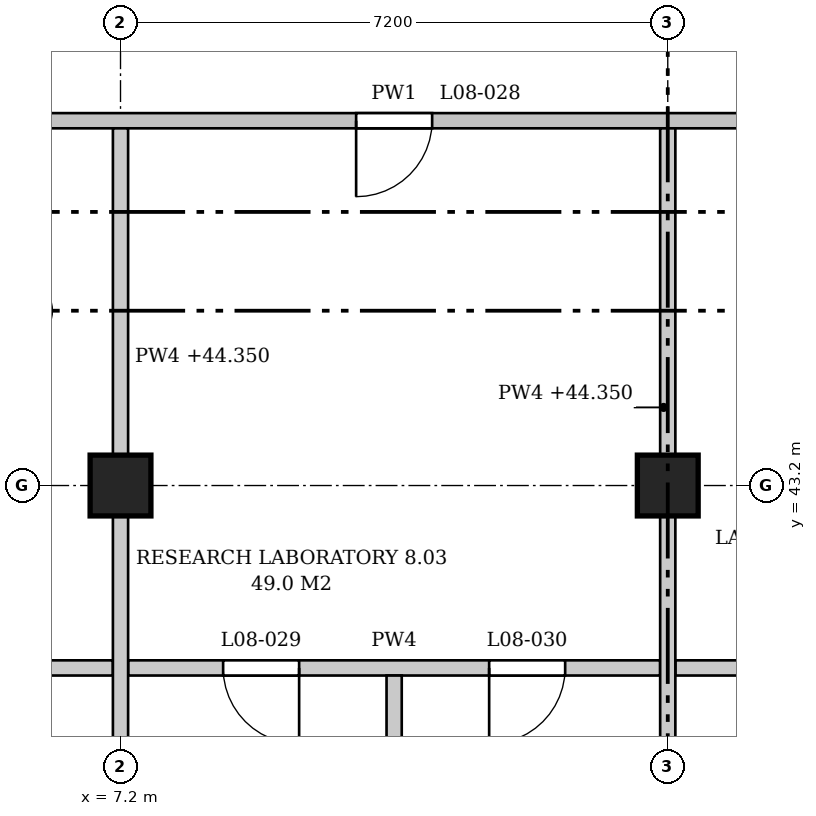
"""IFC4 building model, lengths in metres.
Left out: names, types, materials, properties, quantities, classifications, styles, units other than length and angle.
Written with IfcOpenShell. Run it as: python <this file> out.ifc"""

import sys

from ifc_helpers import new_model, si_unit, direction, frame, frame_2d, origin, origin_2d, place, context, subcontext, project, spatial, polyline, rectangle, outline, extrude, element, fill, save


model = new_model("IFC4")
c1 = context("Model", 3, precision=1e-05, world=origin(), true_north=direction((0.0, 1.0)))
c2 = subcontext(c1, "Body", "Model", "MODEL_VIEW")
j1 = project(units=[si_unit("LENGTHUNIT", "METRE"), si_unit("PLANEANGLEUNIT", "RADIAN")], contexts=[c1])
p1 = place(None, origin())
s1 = spatial("IfcSite", under=j1, at=p1, CompositionType="ELEMENT")
p2 = place(p1, origin())
s2 = spatial("IfcBuilding", under=s1, at=p2, CompositionType="ELEMENT")
p3 = place(p2, frame((0.0, 0.0, 40.8)))
s3 = spatial("IfcBuildingStorey", under=s2, at=p3, CompositionType="ELEMENT", Elevation=40.8)
for number, where, z_axis, x_axis in (
    (1, (7.2, 43.2, 0.0), (0.0, 0.0, 1.0), (1.0, 0.0, 0.0)),
    (2, (14.4, 43.2, 0.0), (0.0, 0.0, 1.0), (1.0, 0.0, 0.0)),
):
    element("IfcColumn", number, at=place(p3, frame(where, z_axis=z_axis, x_axis=x_axis)), inside=s3, PredefinedType="COLUMN", context=c2, shape_type="SweptSolid", body=[
        extrude(rectangle(XDim=0.8, YDim=0.8, at=origin_2d()), origin(), (0.0, 0.0, 1.0), 4.5),
    ])
p4 = place(p3, frame((3.7, 40.8, 0.0), z_axis=(0.0, 0.0, 1.0), x_axis=(1.0, 0.0, 0.0)))
e3 = element("IfcWall", 3, at=p4, inside=s3, PredefinedType="PARTITIONING", context=c2, shape_type="SweptSolid", body=[
    extrude(outline(polyline([(0.0, 0.0), (3.4, 0.0), (3.4, 3.55), (3.275, 3.55), (3.275, 4.25), (0.0, 4.25), (0.0, 0.0)])), frame((0.0, 0.1, 0.0), z_axis=(0.0, -1.0, 0.0), x_axis=(1.0, 0.0, 0.0)), (0.0, 0.0, 1.0), 0.2),
])
p5 = place(p4, frame((1.2, 0.0, 0.0)))
e4 = element("IfcOpeningElement", 4, at=p5, cuts=e3, PredefinedType="OPENING", context=c2, shape_type="SweptSolid", body=[
    extrude(rectangle(XDim=1.0, YDim=2.1, at=frame_2d((0.5, 1.05))), frame((0.0, 0.11, 0.0), z_axis=(0.0, -1.0, 0.0), x_axis=(1.0, 0.0, 0.0)), (0.0, 0.0, 1.0), 0.22),
])
p6 = place(p3, frame((7.3, 40.8, 0.0), z_axis=(0.0, 0.0, 1.0), x_axis=(1.0, 0.0, 0.0)))
e5 = element("IfcWall", 5, at=p6, inside=s3, PredefinedType="PARTITIONING", context=c2, shape_type="SweptSolid", body=[
    extrude(outline(polyline([(0.0, 0.0), (7.0, 0.0), (7.0, 3.55), (6.875, 3.55), (6.875, 4.25), (0.125, 4.25), (0.125, 3.55), (0.0, 3.55), (0.0, 0.0)])), frame((0.0, 0.1, 0.0), z_axis=(0.0, -1.0, 0.0), x_axis=(1.0, 0.0, 0.0)), (0.0, 0.0, 1.0), 0.2),
])
p7 = place(p6, frame((1.25, 0.0, 0.0)))
e6 = element("IfcOpeningElement", 6, at=p7, cuts=e5, PredefinedType="OPENING", context=c2, shape_type="SweptSolid", body=[
    extrude(rectangle(XDim=1.0, YDim=2.1, at=frame_2d((0.5, 1.05))), frame((0.0, 0.11, 0.0), z_axis=(0.0, -1.0, 0.0), x_axis=(1.0, 0.0, 0.0)), (0.0, 0.0, 1.0), 0.22),
])
p8 = place(p6, frame((4.75, 0.0, 0.0)))
e7 = element("IfcOpeningElement", 7, at=p8, cuts=e5, PredefinedType="OPENING", context=c2, shape_type="SweptSolid", body=[
    extrude(rectangle(XDim=1.0, YDim=2.1, at=frame_2d((0.5, 1.05))), frame((0.0, 0.11, 0.0), z_axis=(0.0, -1.0, 0.0), x_axis=(1.0, 0.0, 0.0)), (0.0, 0.0, 1.0), 0.22),
])
p9 = place(p3, frame((14.5, 40.8, 0.0), z_axis=(0.0, 0.0, 1.0), x_axis=(1.0, 0.0, 0.0)))
e8 = element("IfcWall", 8, at=p9, inside=s3, PredefinedType="PARTITIONING", context=c2, shape_type="SweptSolid", body=[
    extrude(outline(polyline([(0.0, 0.0), (3.4, 0.0), (3.4, 4.25), (0.125, 4.25), (0.125, 3.55), (0.0, 3.55), (0.0, 0.0)])), frame((0.0, 0.1, 0.0), z_axis=(0.0, -1.0, 0.0), x_axis=(1.0, 0.0, 0.0)), (0.0, 0.0, 1.0), 0.2),
])
p10 = place(p9, frame((1.2, 0.0, 0.0)))
e9 = element("IfcOpeningElement", 9, at=p10, cuts=e8, PredefinedType="OPENING", context=c2, shape_type="SweptSolid", body=[
    extrude(rectangle(XDim=1.0, YDim=2.1, at=frame_2d((0.5, 1.05))), frame((0.0, 0.11, 0.0), z_axis=(0.0, -1.0, 0.0), x_axis=(1.0, 0.0, 0.0)), (0.0, 0.0, 1.0), 0.22),
])
p11 = place(p3, frame((3.5, 48.0, 0.0), z_axis=(0.0, 0.0, 1.0), x_axis=(1.0, 0.0, 0.0)))
e10 = element("IfcWall", 10, at=p11, inside=s3, PredefinedType="PARTITIONING", context=c2, shape_type="SweptSolid", body=[
    extrude(outline(polyline([(0.0, 0.0), (14.6, 0.0), (14.6, 4.25), (11.125, 4.25), (11.125, 3.55), (10.675, 3.55), (10.675, 4.25), (3.925, 4.25), (3.925, 3.55), (3.475, 3.55), (3.475, 4.25), (0.0, 4.25), (0.0, 0.0)])), frame((0.0, 0.1, 0.0), z_axis=(0.0, -1.0, 0.0), x_axis=(1.0, 0.0, 0.0)), (0.0, 0.0, 1.0), 0.2),
])
p12 = place(p11, frame((1.4, 0.0, 0.0)))
e11 = element("IfcOpeningElement", 11, at=p12, cuts=e10, PredefinedType="OPENING", context=c2, shape_type="SweptSolid", body=[
    extrude(rectangle(XDim=1.0, YDim=2.1, at=frame_2d((0.5, 1.05))), frame((0.0, 0.11, 0.0), z_axis=(0.0, -1.0, 0.0), x_axis=(1.0, 0.0, 0.0)), (0.0, 0.0, 1.0), 0.22),
])
p13 = place(p11, frame((6.8, 0.0, 0.0)))
e12 = element("IfcOpeningElement", 12, at=p13, cuts=e10, PredefinedType="OPENING", context=c2, shape_type="SweptSolid", body=[
    extrude(rectangle(XDim=1.0, YDim=2.1, at=frame_2d((0.5, 1.05))), frame((0.0, 0.11, 0.0), z_axis=(0.0, -1.0, 0.0), x_axis=(1.0, 0.0, 0.0)), (0.0, 0.0, 1.0), 0.22),
])
p14 = place(p3, frame((7.2, 36.4, 0.0), z_axis=(0.0, 0.0, 1.0), x_axis=(0.0, 1.0, 0.0)))
e13 = element("IfcWall", 13, at=p14, inside=s3, PredefinedType="PARTITIONING", context=c2, shape_type="SweptSolid", body=[
    extrude(rectangle(XDim=6.4, YDim=0.2, at=frame_2d((3.2, 0.0))), origin(), (0.0, 0.0, 1.0), 3.55),
])
p15 = place(p3, frame((7.2, 43.6, 0.0), z_axis=(0.0, 0.0, 1.0), x_axis=(0.0, 1.0, 0.0)))
e14 = element("IfcWall", 14, at=p15, inside=s3, PredefinedType="PARTITIONING", context=c2, shape_type="SweptSolid", body=[
    extrude(rectangle(XDim=4.3, YDim=0.2, at=frame_2d((2.15, 0.0))), origin(), (0.0, 0.0, 1.0), 3.55),
])
p16 = place(p3, frame((10.8, 36.15, 0.0), z_axis=(0.0, 0.0, 1.0), x_axis=(0.0, 1.0, 0.0)))
e15 = element("IfcWall", 15, at=p16, inside=s3, PredefinedType="PARTITIONING", context=c2, shape_type="SweptSolid", body=[
    extrude(outline(polyline([(0.0, 0.0), (4.55, 0.0), (4.55, 4.25), (0.05, 4.25), (0.05, 3.65), (0.0, 3.65), (0.0, 0.0)])), frame((0.0, 0.1, 0.0), z_axis=(0.0, -1.0, 0.0), x_axis=(1.0, 0.0, 0.0)), (0.0, 0.0, 1.0), 0.2),
])
p17 = place(p3, frame((14.4, 36.4, 0.0), z_axis=(0.0, 0.0, 1.0), x_axis=(0.0, 1.0, 0.0)))
e16 = element("IfcWall", 16, at=p17, inside=s3, PredefinedType="PARTITIONING", context=c2, shape_type="SweptSolid", body=[
    extrude(rectangle(XDim=6.4, YDim=0.2, at=frame_2d((3.2, 0.0))), origin(), (0.0, 0.0, 1.0), 3.55),
])
p18 = place(p3, frame((14.4, 43.6, 0.0), z_axis=(0.0, 0.0, 1.0), x_axis=(0.0, 1.0, 0.0)))
e17 = element("IfcWall", 17, at=p18, inside=s3, PredefinedType="PARTITIONING", context=c2, shape_type="SweptSolid", body=[
    extrude(rectangle(XDim=4.3, YDim=0.2, at=frame_2d((2.15, 0.0))), origin(), (0.0, 0.0, 1.0), 3.55),
])
p19 = place(p13, frame((1.0, 0.0, 0.0), z_axis=(0.0, 0.0, 1.0), x_axis=(-1.0, 0.0, 0.0)))
e18 = element("IfcDoor", 18, at=p19, inside=s3, OperationType="SINGLE_SWING_RIGHT", PredefinedType="DOOR", context=c2, shape_type="SweptSolid", body=[
    extrude(rectangle(XDim=1.0, YDim=2.1, at=frame_2d((0.5, 1.05))), frame((0.0, 0.025, 0.0), z_axis=(0.0, -1.0, 0.0), x_axis=(1.0, 0.0, 0.0)), (0.0, 0.0, 1.0), 0.05),
])
fill(e12, e18)
p20 = place(p7, frame((1.0, 0.0, 0.0), z_axis=(0.0, 0.0, 1.0), x_axis=(-1.0, 0.0, 0.0)))
e19 = element("IfcDoor", 19, at=p20, inside=s3, OperationType="SINGLE_SWING_LEFT", PredefinedType="DOOR", context=c2, shape_type="SweptSolid", body=[
    extrude(rectangle(XDim=1.0, YDim=2.1, at=frame_2d((0.5, 1.05))), frame((0.0, 0.025, 0.0), z_axis=(0.0, -1.0, 0.0), x_axis=(1.0, 0.0, 0.0)), (0.0, 0.0, 1.0), 0.05),
])
fill(e6, e19)
p21 = place(p8, frame((1.0, 0.0, 0.0), z_axis=(0.0, 0.0, 1.0), x_axis=(-1.0, 0.0, 0.0)))
e20 = element("IfcDoor", 20, at=p21, inside=s3, OperationType="SINGLE_SWING_RIGHT", PredefinedType="DOOR", context=c2, shape_type="SweptSolid", body=[
    extrude(rectangle(XDim=1.0, YDim=2.1, at=frame_2d((0.5, 1.05))), frame((0.0, 0.025, 0.0), z_axis=(0.0, -1.0, 0.0), x_axis=(1.0, 0.0, 0.0)), (0.0, 0.0, 1.0), 0.05),
])
fill(e7, e20)
save(model, sys.argv[1])
